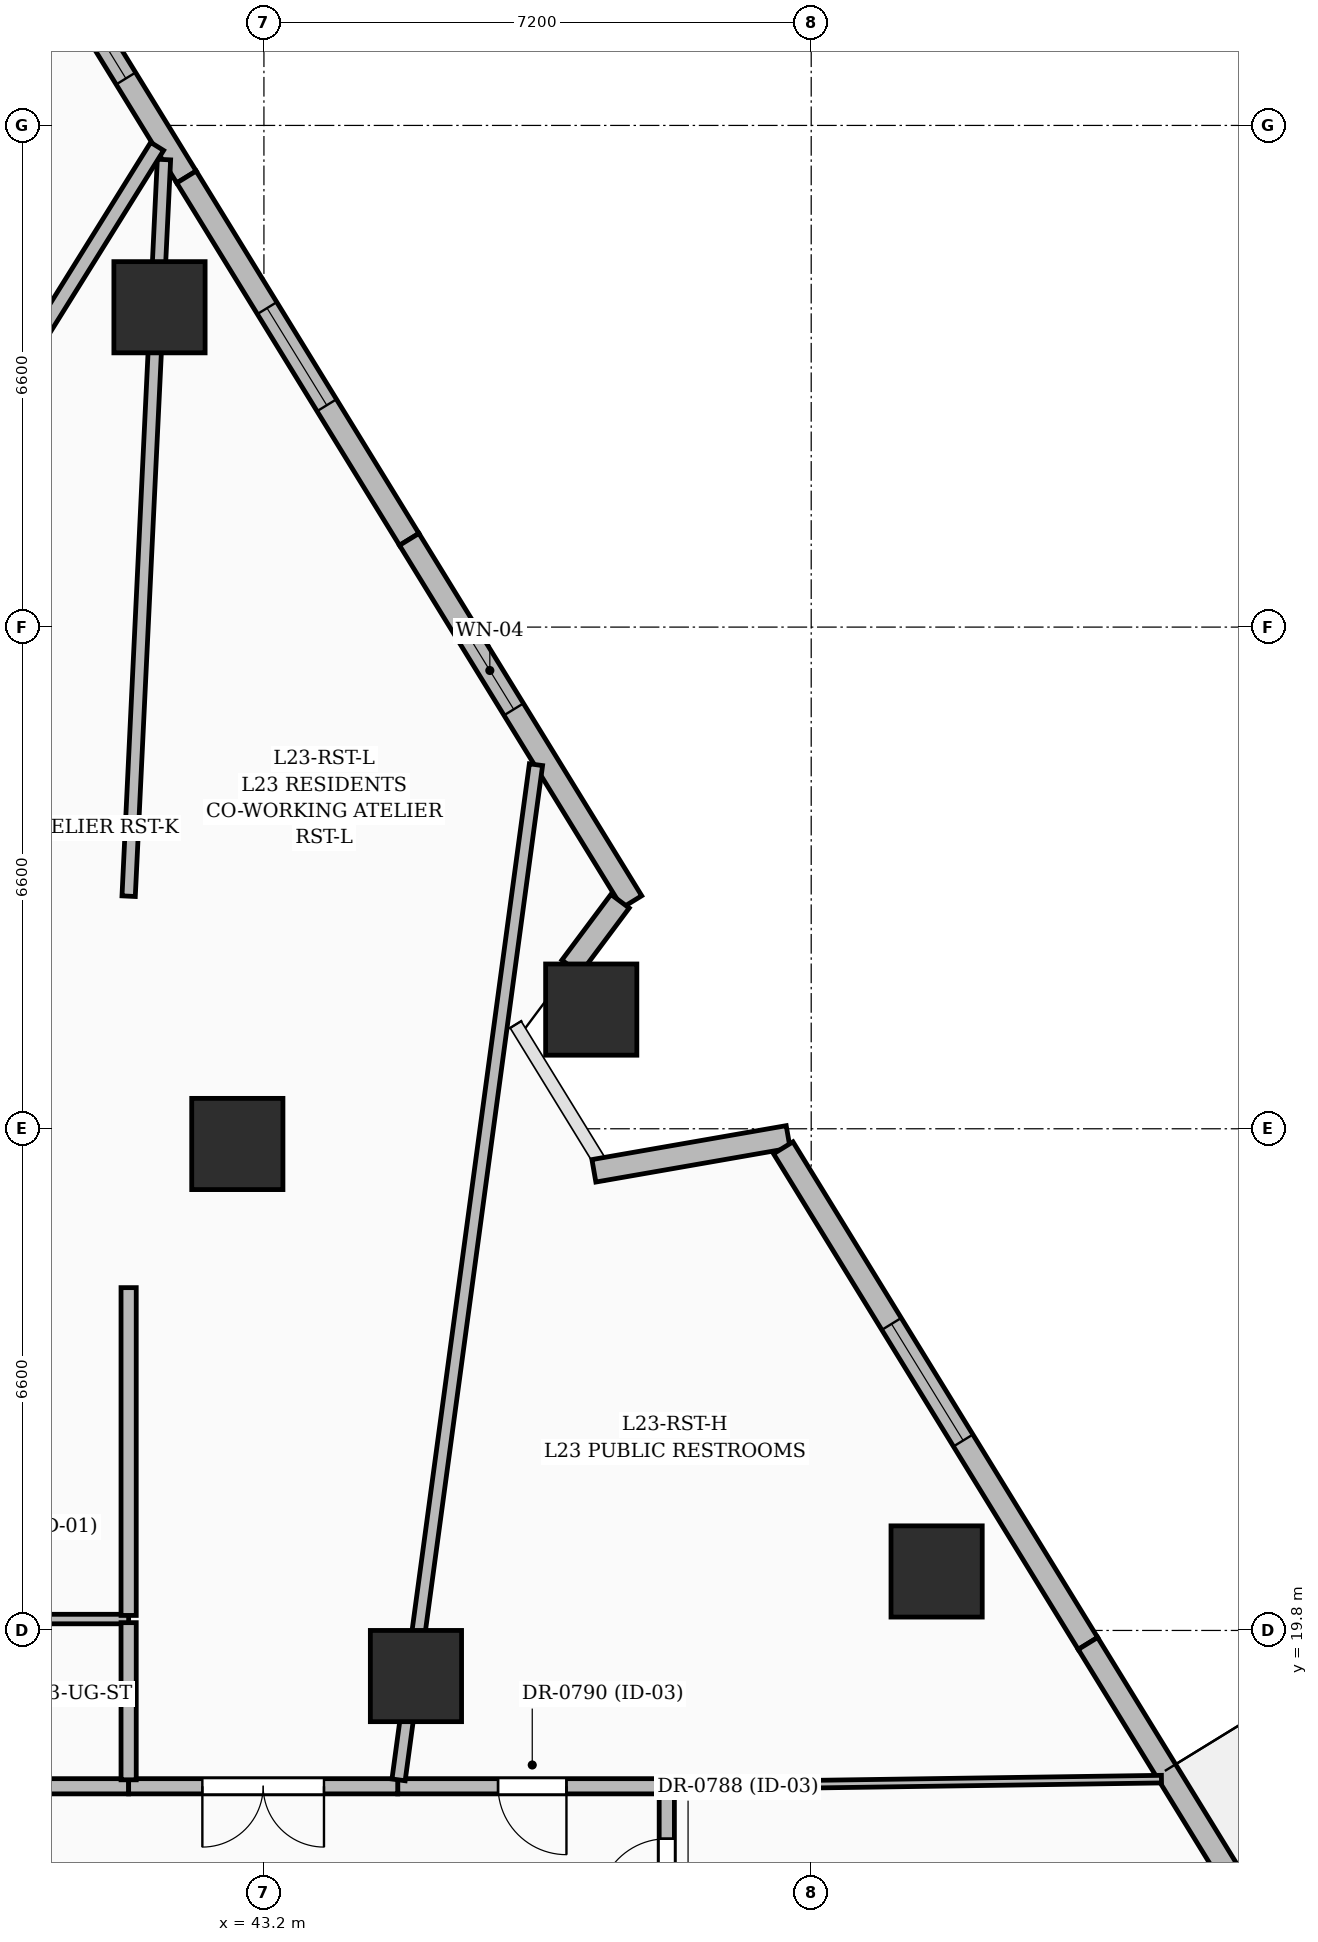
"""IFC4 building model, lengths in metres.
Left out: names, types, materials, properties, quantities, classifications, styles, units other than length and angle.
Written with IfcOpenShell. Run it as: python <this file> out.ifc"""

import sys

from ifc_helpers import new_model, si_unit, direction, frame, frame_2d, origin, origin_2d, place, context, subcontext, project, spatial, rectangle, extrude, element, fill, save


model = new_model("IFC4")
c1 = context("Model", 3, precision=1e-05, world=origin(), true_north=direction((0.0, 1.0)))
c2 = subcontext(c1, "Body", "Model", "MODEL_VIEW")
j1 = project(units=[si_unit("LENGTHUNIT", "METRE"), si_unit("PLANEANGLEUNIT", "RADIAN")], contexts=[c1])
p1 = place(None, origin())
s1 = spatial("IfcSite", under=j1, at=p1, CompositionType="ELEMENT")
p2 = place(p1, origin())
s2 = spatial("IfcBuilding", under=s1, at=p2, CompositionType="ELEMENT")
p3 = place(p2, frame((0.0, 0.0, 93.0)))
s3 = spatial("IfcBuildingStorey", under=s2, at=p3, CompositionType="ELEMENT", Elevation=93.0)
for number, where, z_axis, x_axis in (
    (1, (45.2, 19.2, 0.0), (0.0, 0.0, 1.0), (1.0, 0.0, 0.0)),
    (2, (42.85, 26.2, 0.0), (0.0, 0.0, 1.0), (1.0, 0.0, 0.0)),
    (3, (52.05, 20.576, 0.0), (0.0, 0.0, 1.0), (1.0, 0.0, 0.0)),
    (4, (47.506, 27.968, 0.0), (0.0, 0.0, 1.0), (1.0, 0.0, 0.0)),
    (5, (41.826, 37.208, 0.0), (0.0, 0.0, 1.0), (1.0, 0.0, 0.0)),
):
    element("IfcColumn", number, at=place(p3, frame(where, z_axis=z_axis, x_axis=x_axis)), inside=s3, PredefinedType="COLUMN", context=c2, shape_type="SweptSolid", body=[
        extrude(rectangle(XDim=1.2, YDim=1.2, at=origin_2d()), origin(), (0.0, 0.0, 1.0), 3.6),
    ])
p4 = place(p3, frame((39.54, 43.217, 0.0), z_axis=(0.0, 0.0, 1.0), x_axis=(0.52373802156, -0.851879383935, 0.0)))
e6 = element("IfcWall", 6, at=p4, inside=s3, PredefinedType="SOLIDWALL", context=c2, shape_type="SweptSolid", body=[
    extrude(rectangle(XDim=5.042, YDim=0.3, at=frame_2d((2.521, 0.0))), origin(), (0.0, 0.0, 1.0), 3.35),
])
p5 = place(p4, frame((1.92, 0.0, 0.55)))
e7 = element("IfcOpeningElement", 7, at=p5, cuts=e6, PredefinedType="OPENING", context=c2, shape_type="SweptSolid", body=[
    extrude(rectangle(XDim=1.6, YDim=2.2, at=frame_2d((0.8, 1.1))), frame((0.0, 0.16, 0.0), z_axis=(0.0, -1.0, 0.0), x_axis=(1.0, 0.0, 0.0)), (0.0, 0.0, 1.0), 0.32),
])
p6 = place(p3, frame((42.181, 38.922, 0.0), z_axis=(0.0, 0.0, 1.0), x_axis=(0.523678708762, -0.851915846777, 0.0)))
e8 = element("IfcWall", 8, at=p6, inside=s3, PredefinedType="SOLIDWALL", context=c2, shape_type="SweptSolid", body=[
    extrude(rectangle(XDim=5.596, YDim=0.3, at=frame_2d((2.798, 0.0))), origin(), (0.0, 0.0, 1.0), 3.35),
])
p7 = place(p6, frame((2.025, 0.0, 0.6)))
e9 = element("IfcOpeningElement", 9, at=p7, cuts=e8, PredefinedType="OPENING", context=c2, shape_type="SweptSolid", body=[
    extrude(rectangle(XDim=1.5, YDim=2.1, at=frame_2d((0.75, 1.05))), frame((0.0, 0.16, 0.0), z_axis=(0.0, -1.0, 0.0), x_axis=(1.0, 0.0, 0.0)), (0.0, 0.0, 1.0), 0.32),
])
p8 = place(p3, frame((45.111, 34.154, 0.0), z_axis=(0.0, 0.0, 1.0), x_axis=(0.523710369238, -0.851896384047, 0.0)))
e10 = element("IfcWall", 10, at=p8, inside=s3, PredefinedType="SOLIDWALL", context=c2, shape_type="SweptSolid", body=[
    extrude(rectangle(XDim=5.596, YDim=0.3, at=frame_2d((2.798, 0.0))), origin(), (0.0, 0.0, 1.0), 3.35),
])
p9 = place(p8, frame((1.425, 0.0, 0.8)))
e11 = element("IfcOpeningElement", 11, at=p9, cuts=e10, PredefinedType="OPENING", context=c2, shape_type="SweptSolid", body=[
    extrude(rectangle(XDim=1.2, YDim=1.8, at=frame_2d((0.6, 0.9))), frame((0.0, 0.16, 0.0), z_axis=(0.0, -1.0, 0.0), x_axis=(1.0, 0.0, 0.0)), (0.0, 0.0, 1.0), 0.32),
])
p10 = place(p3, frame((47.885, 29.394, 0.0), z_axis=(0.0, 0.0, 1.0), x_axis=(-0.598186461049, -0.801356947819, 0.0)))
e12 = element("IfcWall", 12, at=p10, inside=s3, PredefinedType="SOLIDWALL", context=c2, shape_type="SweptSolid", body=[
    extrude(rectangle(XDim=1.078, YDim=0.3, at=frame_2d((0.539, 0.0))), origin(), (0.0, 0.0, 1.0), 2.375),
])
p11 = place(p3, frame((47.541, 25.847, 0.0), z_axis=(0.0, 0.0, 1.0), x_axis=(0.985095505459, 0.172008270511, 0.0)))
e13 = element("IfcWall", 13, at=p11, inside=s3, PredefinedType="SOLIDWALL", context=c2, shape_type="SweptSolid", body=[
    extrude(rectangle(XDim=2.594, YDim=0.3, at=frame_2d((1.297, 0.0))), origin(), (0.0, 0.0, 1.0), 2.375),
])
p12 = place(p3, frame((50.032, 26.15, 0.0), z_axis=(0.0, 0.0, 1.0), x_axis=(0.523673810553, -0.851918857721, 0.0)))
e14 = element("IfcWall", 14, at=p12, inside=s3, PredefinedType="SOLIDWALL", context=c2, shape_type="SweptSolid", body=[
    extrude(rectangle(XDim=7.654, YDim=0.3, at=frame_2d((3.827, 0.0))), origin(), (0.0, 0.0, 1.0), 3.35),
])
p13 = place(p12, frame((2.72, 0.0, 0.6)))
e15 = element("IfcOpeningElement", 15, at=p13, cuts=e14, PredefinedType="OPENING", context=c2, shape_type="SweptSolid", body=[
    extrude(rectangle(XDim=1.8, YDim=2.1, at=frame_2d((0.9, 1.05))), frame((0.0, 0.16, 0.0), z_axis=(0.0, -1.0, 0.0), x_axis=(1.0, 0.0, 0.0)), (0.0, 0.0, 1.0), 0.32),
])
p14 = place(p3, frame((54.041, 19.629, 0.0), z_axis=(0.0, 0.0, 1.0), x_axis=(0.523661280051, -0.851926560083, 0.0)))
e16 = element("IfcWall", 16, at=p14, inside=s3, PredefinedType="SOLIDWALL", context=c2, shape_type="SweptSolid", body=[
    extrude(rectangle(XDim=7.934, YDim=0.3, at=frame_2d((3.967, 0.0))), origin(), (0.0, 0.0, 1.0), 3.35),
])
p15 = place(p14, frame((4.146, 0.0, 0.0)))
e17 = element("IfcOpeningElement", 17, at=p15, cuts=e16, PredefinedType="OPENING", context=c2, shape_type="SweptSolid", body=[
    extrude(rectangle(XDim=1.0, YDim=2.2, at=frame_2d((0.5, 1.1))), frame((0.0, 0.16, 0.0), z_axis=(0.0, -1.0, 0.0), x_axis=(1.0, 0.0, 0.0)), (0.0, 0.0, 1.0), 0.32),
])
p16 = place(p3, frame((48.5, 15.47, 0.0), z_axis=(0.0, 0.0, 1.0), x_axis=(0.0, 1.0, 0.0)))
e18 = element("IfcWall", 18, at=p16, inside=s3, PredefinedType="PARTITIONING", context=c2, shape_type="SweptSolid", body=[
    extrude(rectangle(XDim=2.28, YDim=0.2, at=frame_2d((1.14, 0.0))), origin(), (0.0, 0.0, 1.0), 2.345),
])
p17 = place(p16, frame((0.69, 0.0, 0.0)))
e19 = element("IfcOpeningElement", 19, at=p17, cuts=e18, PredefinedType="OPENING", context=c2, shape_type="SweptSolid", body=[
    extrude(rectangle(XDim=0.9, YDim=2.1, at=frame_2d((0.45, 1.05))), frame((0.0, 0.11, 0.0), z_axis=(0.0, -1.0, 0.0), x_axis=(1.0, 0.0, 0.0)), (0.0, 0.0, 1.0), 0.22),
])
p18 = place(p3, frame((41.42, 17.75, 0.0), z_axis=(0.0, 0.0, 1.0), x_axis=(-1.0, 0.0, 0.0)))
e20 = element("IfcWall", 20, at=p18, inside=s3, PredefinedType="PARTITIONING", context=c2, shape_type="SweptSolid", body=[
    extrude(rectangle(XDim=5.1, YDim=0.2, at=frame_2d((2.55, 0.0))), origin(), (0.0, 0.0, 1.0), 3.35),
])
p19 = place(p18, frame((2.05, 0.0, 0.0)))
e21 = element("IfcOpeningElement", 21, at=p19, cuts=e20, PredefinedType="OPENING", context=c2, shape_type="SweptSolid", body=[
    extrude(rectangle(XDim=1.0, YDim=2.2, at=frame_2d((0.5, 1.1))), frame((0.0, 0.11, 0.0), z_axis=(0.0, -1.0, 0.0), x_axis=(1.0, 0.0, 0.0)), (0.0, 0.0, 1.0), 0.22),
])
p20 = place(p3, frame((48.415, 17.75, 0.0), z_axis=(0.0, 0.0, 1.0), x_axis=(-1.0, 0.0, 0.0)))
e22 = element("IfcWall", 22, at=p20, inside=s3, PredefinedType="PARTITIONING", context=c2, shape_type="SweptSolid", body=[
    extrude(rectangle(XDim=3.455, YDim=0.2, at=frame_2d((1.728, 0.0))), origin(), (0.0, 0.0, 1.0), 2.309),
])
p21 = place(p20, frame((1.235, 0.0, 0.0)))
e23 = element("IfcOpeningElement", 23, at=p21, cuts=e22, PredefinedType="OPENING", context=c2, shape_type="SweptSolid", body=[
    extrude(rectangle(XDim=0.9, YDim=2.1, at=frame_2d((0.45, 1.05))), frame((0.0, 0.11, 0.0), z_axis=(0.0, -1.0, 0.0), x_axis=(1.0, 0.0, 0.0)), (0.0, 0.0, 1.0), 0.22),
])
p22 = place(p3, frame((44.96, 17.75, 0.0), z_axis=(0.0, 0.0, 1.0), x_axis=(-1.0, 0.0, 0.0)))
e24 = element("IfcWall", 24, at=p22, inside=s3, PredefinedType="PARTITIONING", context=c2, shape_type="SweptSolid", body=[
    extrude(rectangle(XDim=3.54, YDim=0.2, at=frame_2d((1.77, 0.0))), origin(), (0.0, 0.0, 1.0), 3.35),
])
p23 = place(p22, frame((0.97, 0.0, 0.0)))
e25 = element("IfcOpeningElement", 25, at=p23, cuts=e24, PredefinedType="OPENING", context=c2, shape_type="SweptSolid", body=[
    extrude(rectangle(XDim=1.6, YDim=2.3, at=frame_2d((0.8, 1.15))), frame((0.0, 0.11, 0.0), z_axis=(0.0, -1.0, 0.0), x_axis=(1.0, 0.0, 0.0)), (0.0, 0.0, 1.0), 0.22),
])
p24 = place(p3, frame((55.008, 17.844, 0.0), z_axis=(0.0, 0.0, 1.0), x_axis=(-0.999895156148, -0.014480217967, 0.0)))
e26 = element("IfcWall", 26, at=p24, inside=s3, PredefinedType="PARTITIONING", context=c2, shape_type="SweptSolid", body=[
    extrude(rectangle(XDim=6.424, YDim=0.1, at=frame_2d((3.212, 0.0))), origin(), (0.0, 0.0, 1.0), 2.345),
])
p25 = place(p3, frame((41.42, 19.95, 0.0), z_axis=(0.0, 0.0, 1.0), x_axis=(-1.0, 0.0, 0.0)))
e27 = element("IfcWall", 27, at=p25, inside=s3, PredefinedType="PARTITIONING", context=c2, shape_type="SweptSolid", body=[
    extrude(rectangle(XDim=5.1, YDim=0.125, at=frame_2d((2.55, 0.0))), origin(), (0.0, 0.0, 1.0), 3.35),
])
p26 = place(p25, frame((2.016, 0.0, 0.0)))
e28 = element("IfcOpeningElement", 28, at=p26, cuts=e27, PredefinedType="OPENING", context=c2, shape_type="SweptSolid", body=[
    extrude(rectangle(XDim=0.95, YDim=2.2, at=frame_2d((0.475, 1.1))), frame((0.0, 0.072, 0.0), z_axis=(0.0, -1.0, 0.0), x_axis=(1.0, 0.0, 0.0)), (0.0, 0.0, 1.0), 0.145),
])
p27 = place(p3, frame((41.42, 17.835, 0.0), z_axis=(0.0, 0.0, 1.0), x_axis=(0.0, 1.0, 0.0)))
e29 = element("IfcWall", 29, at=p27, inside=s3, PredefinedType="PARTITIONING", context=c2, shape_type="SweptSolid", body=[
    extrude(rectangle(XDim=2.068, YDim=0.2, at=frame_2d((1.034, 0.0))), origin(), (0.0, 0.0, 1.0), 3.35),
])
p28 = place(p3, frame((41.42, 19.998, 0.0), z_axis=(0.0, 0.0, 1.0), x_axis=(0.0, 1.0, 0.0)))
e30 = element("IfcWall", 30, at=p28, inside=s3, PredefinedType="PARTITIONING", context=c2, shape_type="SweptSolid", body=[
    extrude(rectangle(XDim=4.312, YDim=0.2, at=frame_2d((2.156, 0.0))), origin(), (0.0, 0.0, 1.0), 3.35),
])
p29 = place(p3, frame((46.779, 31.19, 0.0), z_axis=(0.0, 0.0, 1.0), x_axis=(-0.134139063058, -0.990962517839, 0.0)))
e31 = element("IfcWall", 31, at=p29, inside=s3, PredefinedType="PARTITIONING", context=c2, shape_type="SweptSolid", body=[
    extrude(rectangle(XDim=13.478, YDim=0.175, at=frame_2d((6.739, 0.0))), origin(), (0.0, 0.0, 1.0), 2.309),
])
p30 = place(p3, frame((41.42, 29.46, 0.0), z_axis=(0.0, 0.0, 1.0), x_axis=(0.047936966321, 0.998850362797, 0.0)))
e32 = element("IfcWall", 32, at=p30, inside=s3, PredefinedType="PARTITIONING", context=c2, shape_type="SweptSolid", body=[
    extrude(rectangle(XDim=9.702, YDim=0.175, at=frame_2d((4.851, 0.0))), origin(), (0.0, 0.0, 1.0), 2.345),
])
p31 = place(p3, frame((41.795, 39.324, 0.0), z_axis=(0.0, 0.0, 1.0), x_axis=(-0.528868032501, -0.848704073396, 0.0)))
e33 = element("IfcWall", 33, at=p31, inside=s3, PredefinedType="PARTITIONING", context=c2, shape_type="SweptSolid", body=[
    extrude(rectangle(XDim=3.999, YDim=0.2, at=frame_2d((2.0, 0.0))), origin(), (0.0, 0.0, 1.0), 2.37),
])
p32 = place(p5, origin())
e34 = element("IfcWindow", 34, at=p32, inside=s3, PartitioningType="SINGLE_PANEL", PredefinedType="WINDOW", context=c2, shape_type="SweptSolid", body=[
    extrude(rectangle(XDim=1.6, YDim=2.2, at=frame_2d((0.8, 1.1))), frame((0.0, 0.03, 0.0), z_axis=(0.0, -1.0, 0.0), x_axis=(1.0, 0.0, 0.0)), (0.0, 0.0, 1.0), 0.06),
])
fill(e7, e34)
p33 = place(p7, origin())
e35 = element("IfcWindow", 35, at=p33, inside=s3, PartitioningType="SINGLE_PANEL", PredefinedType="WINDOW", context=c2, shape_type="SweptSolid", body=[
    extrude(rectangle(XDim=1.5, YDim=2.1, at=frame_2d((0.75, 1.05))), frame((0.0, 0.03, 0.0), z_axis=(0.0, -1.0, 0.0), x_axis=(1.0, 0.0, 0.0)), (0.0, 0.0, 1.0), 0.06),
])
fill(e9, e35)
p34 = place(p9, origin())
e36 = element("IfcWindow", 36, at=p34, inside=s3, PartitioningType="SINGLE_PANEL", PredefinedType="WINDOW", context=c2, shape_type="SweptSolid", body=[
    extrude(rectangle(XDim=1.2, YDim=1.8, at=frame_2d((0.6, 0.9))), frame((0.0, 0.03, 0.0), z_axis=(0.0, -1.0, 0.0), x_axis=(1.0, 0.0, 0.0)), (0.0, 0.0, 1.0), 0.06),
])
fill(e11, e36)
p35 = place(p13, origin())
e37 = element("IfcWindow", 37, at=p35, inside=s3, PartitioningType="SINGLE_PANEL", PredefinedType="WINDOW", context=c2, shape_type="SweptSolid", body=[
    extrude(rectangle(XDim=1.8, YDim=2.1, at=frame_2d((0.9, 1.05))), frame((0.0, 0.03, 0.0), z_axis=(0.0, -1.0, 0.0), x_axis=(1.0, 0.0, 0.0)), (0.0, 0.0, 1.0), 0.06),
])
fill(e15, e37)
p36 = place(p17, origin())
e38 = element("IfcDoor", 38, at=p36, inside=s3, OperationType="SINGLE_SWING_LEFT", PredefinedType="DOOR", context=c2, shape_type="SweptSolid", body=[
    extrude(rectangle(XDim=0.9, YDim=2.1, at=frame_2d((0.45, 1.05))), frame((0.0, 0.025, 0.0), z_axis=(0.0, -1.0, 0.0), x_axis=(1.0, 0.0, 0.0)), (0.0, 0.0, 1.0), 0.05),
])
fill(e19, e38)
p37 = place(p21, origin())
e39 = element("IfcDoor", 39, at=p37, inside=s3, OperationType="SINGLE_SWING_LEFT", PredefinedType="DOOR", context=c2, shape_type="SweptSolid", body=[
    extrude(rectangle(XDim=0.9, YDim=2.1, at=frame_2d((0.45, 1.05))), frame((0.0, 0.025, 0.0), z_axis=(0.0, -1.0, 0.0), x_axis=(1.0, 0.0, 0.0)), (0.0, 0.0, 1.0), 0.05),
])
fill(e23, e39)
p38 = place(p23, origin())
e40 = element("IfcDoor", 40, at=p38, inside=s3, OperationType="DOUBLE_DOOR_SINGLE_SWING", PredefinedType="DOOR", context=c2, shape_type="SweptSolid", body=[
    extrude(rectangle(XDim=1.6, YDim=2.3, at=frame_2d((0.8, 1.15))), frame((0.0, 0.025, 0.0), z_axis=(0.0, -1.0, 0.0), x_axis=(1.0, 0.0, 0.0)), (0.0, 0.0, 1.0), 0.05),
])
fill(e25, e40)
save(model, sys.argv[1])
